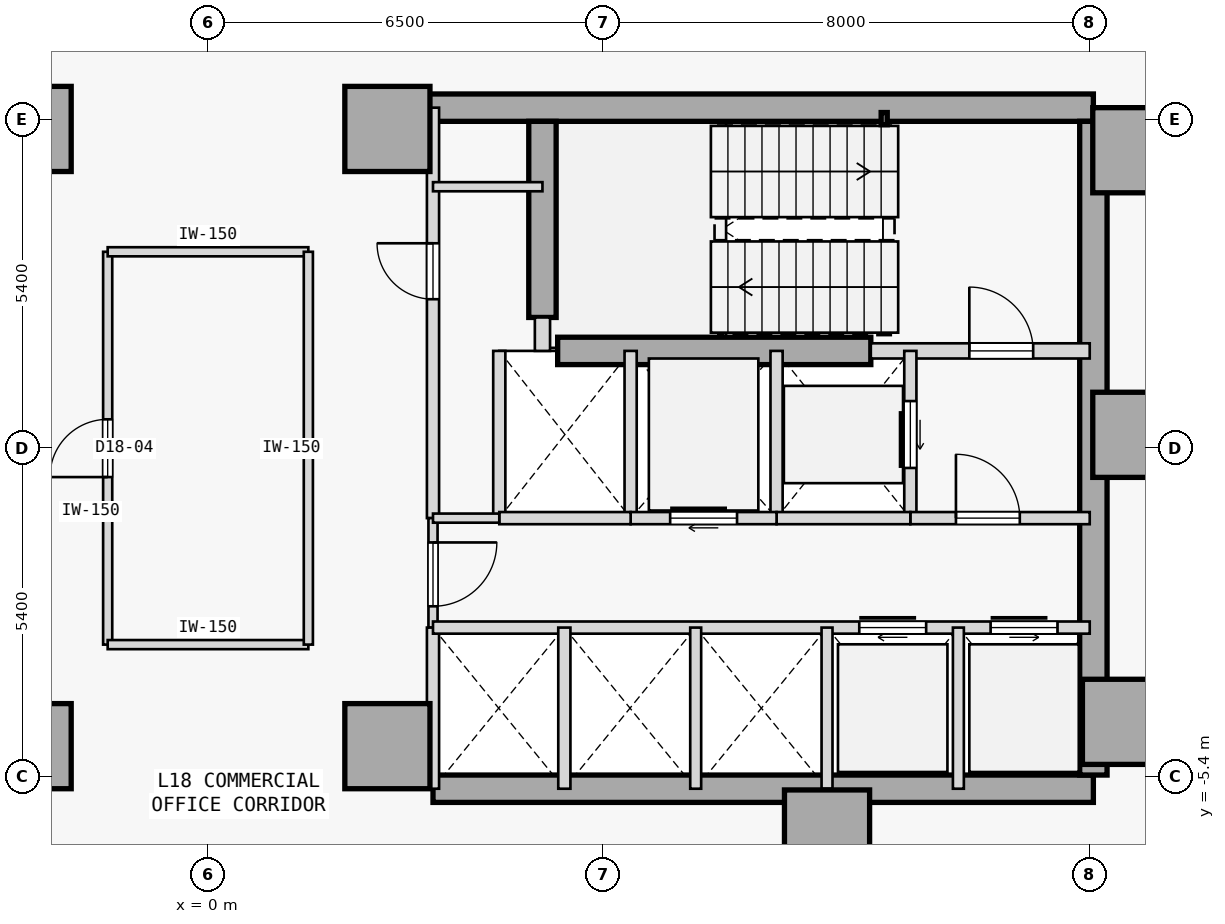
"""IFC4 building model, lengths in metres.
Left out: names, types, materials, properties, quantities, classifications, styles, units other than length and angle.
Written with IfcOpenShell. Run it as: python <this file> out.ifc"""

import sys

from ifc_helpers import new_model, si_unit, direction, frame, frame_2d, origin, origin_2d, place, context, subcontext, project, spatial, rectangle, hollow_rectangle, extrude, element, fill, save


model = new_model("IFC4")
c1 = context("Model", 3, precision=1e-05, world=origin(), true_north=direction((0.0, 1.0)))
c2 = subcontext(c1, "Body", "Model", "MODEL_VIEW")
j1 = project(units=[si_unit("LENGTHUNIT", "METRE"), si_unit("PLANEANGLEUNIT", "RADIAN")], contexts=[c1])
p1 = place(None, origin())
s1 = spatial("IfcSite", under=j1, at=p1, CompositionType="ELEMENT")
p2 = place(p1, origin())
s2 = spatial("IfcBuilding", under=s1, at=p2, CompositionType="ELEMENT")
p3 = place(p2, frame((0.0, 0.0, 75.0)))
s3 = spatial("IfcBuildingStorey", under=s2, at=p3, CompositionType="ELEMENT", Elevation=75.0)
for number, where, z_axis, x_axis in (
    (1, (-2.95, -4.9, 0.0), (0.0, 0.0, 1.0), (1.0, 0.0, 0.0)),
    (2, (-2.95, 5.25, 0.0), (0.0, 0.0, 1.0), (1.0, 0.0, 0.0)),
    (3, (15.25, 4.9, 0.0), (0.0, 0.0, 1.0), (1.0, 0.0, 0.0)),
    (4, (15.25, 0.22, 0.0), (0.0, 0.0, 1.0), (1.0, 0.0, 0.0)),
    (5, (15.08, -4.5, 0.0), (0.0, 0.0, 1.0), (1.0, 0.0, 0.0)),
    (6, (10.18, -6.32, 0.0), (0.0, 0.0, 1.0), (1.0, 0.0, 0.0)),
    (7, (2.95, -4.9, 0.0), (0.0, 0.0, 1.0), (1.0, 0.0, 0.0)),
    (8, (2.95, 5.25, 0.0), (0.0, 0.0, 1.0), (1.0, 0.0, 0.0)),
):
    element("IfcColumn", number, at=place(p3, frame(where, z_axis=z_axis, x_axis=x_axis)), inside=s3, PredefinedType="COLUMN", context=c2, shape_type="SweptSolid", body=[
        extrude(rectangle(XDim=1.4, YDim=1.4, at=origin_2d()), origin(), (0.0, 0.0, 1.0), 3.8),
    ])
p4 = place(p3, frame((3.15, 5.6, 0.0), z_axis=(0.0, 0.0, 1.0), x_axis=(1.0, 0.0, 0.0)))
e9 = element("IfcWall", 9, at=p4, inside=s3, PredefinedType="SHEAR", context=c2, shape_type="SweptSolid", body=[
    extrude(rectangle(XDim=11.41, YDim=0.45, at=frame_2d((5.705, 0.0))), origin(), (0.0, 0.0, 1.0), 3.4),
])
p5 = place(p3, frame((3.7, -5.6, 0.0), z_axis=(0.0, 0.0, 1.0), x_axis=(1.0, 0.0, 0.0)))
e10 = element("IfcWall", 10, at=p5, inside=s3, PredefinedType="SHEAR", context=c2, shape_type="SweptSolid", body=[
    extrude(rectangle(XDim=10.86, YDim=0.45, at=frame_2d((5.43, 0.0))), origin(), (0.0, 0.0, 1.0), 3.4),
])
p6 = place(p3, frame((14.56, -5.375, 0.0), z_axis=(0.0, 0.0, 1.0), x_axis=(0.0, 1.0, 0.0)))
e11 = element("IfcWall", 11, at=p6, inside=s3, PredefinedType="SHEAR", context=c2, shape_type="SweptSolid", body=[
    extrude(rectangle(XDim=10.75, YDim=0.45, at=frame_2d((5.375, 0.0))), origin(), (0.0, 0.0, 1.0), 3.4),
])
p7 = place(p3, frame((5.5, 2.15, 0.0), z_axis=(0.0, 0.0, 1.0), x_axis=(0.0, 1.0, 0.0)))
e12 = element("IfcWall", 12, at=p7, inside=s3, PredefinedType="SHEAR", context=c2, shape_type="SweptSolid", body=[
    extrude(rectangle(XDim=3.225, YDim=0.45, at=frame_2d((1.613, 0.0))), origin(), (0.0, 0.0, 1.0), 3.4),
])
p8 = place(p3, frame((5.75, 1.6, 0.0), z_axis=(0.0, 0.0, 1.0), x_axis=(1.0, 0.0, 0.0)))
e13 = element("IfcWall", 13, at=p8, inside=s3, PredefinedType="SHEAR", context=c2, shape_type="SweptSolid", body=[
    extrude(rectangle(XDim=5.15, YDim=0.45, at=frame_2d((2.575, 0.0))), origin(), (0.0, 0.0, 1.0), 3.4),
])
p9 = place(p3, frame((11.12, 5.42, 0.0), z_axis=(0.0, 0.0, 1.0), x_axis=(1.0, 0.0, 0.0)))
e14 = element("IfcColumn", 14, at=p9, inside=s3, PredefinedType="COLUMN", context=c2, shape_type="SweptSolid", body=[
    extrude(hollow_rectangle(XDim=0.1, YDim=0.2, WallThickness=0.008, at=origin_2d()), origin(), (0.0, 0.0, 1.0), 3.8),
])
p10 = place(p3, frame((10.9, 1.6, 0.0), z_axis=(0.0, 0.0, 1.0), x_axis=(1.0, 0.0, 0.0)))
e15 = element("IfcWall", 15, at=p10, inside=s3, PredefinedType="STANDARD", context=c2, shape_type="SweptSolid", body=[
    extrude(rectangle(XDim=3.6, YDim=0.25, at=frame_2d((1.8, 0.0))), origin(), (0.0, 0.0, 1.0), 3.4),
])
p11 = place(p10, frame((1.62, 0.0, 0.0)))
e16 = element("IfcOpeningElement", 16, at=p11, cuts=e15, PredefinedType="OPENING", context=c2, shape_type="SweptSolid", body=[
    extrude(rectangle(XDim=1.05, YDim=2.15, at=frame_2d((0.525, 1.075))), frame((0.0, 0.135, 0.0), z_axis=(0.0, -1.0, 0.0), x_axis=(1.0, 0.0, 0.0)), (0.0, 0.0, 1.0), 0.27),
])
p12 = place(p3, frame((5.5, 1.6, 0.0), z_axis=(0.0, 0.0, 1.0), x_axis=(0.0, 1.0, 0.0)))
e17 = element("IfcWall", 17, at=p12, inside=s3, PredefinedType="STANDARD", context=c2, shape_type="SweptSolid", body=[
    extrude(rectangle(XDim=0.55, YDim=0.25, at=frame_2d((0.275, 0.0))), origin(), (0.0, 0.0, 1.0), 3.4),
])
p13 = place(p3, frame((3.7, -1.15, 0.0), z_axis=(0.0, 0.0, 1.0), x_axis=(0.0, 1.0, 0.0)))
e18 = element("IfcWall", 18, at=p13, inside=s3, PredefinedType="STANDARD", context=c2, shape_type="SweptSolid", body=[
    extrude(rectangle(XDim=6.75, YDim=0.2, at=frame_2d((3.375, 0.0))), origin(), (0.0, 0.0, 1.0), 3.4),
])
p14 = place(p13, frame((3.6, 0.0, 0.0)))
e19 = element("IfcOpeningElement", 19, at=p14, cuts=e18, PredefinedType="OPENING", context=c2, shape_type="SweptSolid", body=[
    extrude(rectangle(XDim=0.92, YDim=2.15, at=frame_2d((0.46, 1.075))), frame((0.0, 0.11, 0.0), z_axis=(0.0, -1.0, 0.0), x_axis=(1.0, 0.0, 0.0)), (0.0, 0.0, 1.0), 0.22),
])
p15 = place(p3, frame((3.7, -2.95, 0.0), z_axis=(0.0, 0.0, 1.0), x_axis=(0.0, 1.0, 0.0)))
e20 = element("IfcWall", 20, at=p15, inside=s3, PredefinedType="PARTITIONING", context=c2, shape_type="SweptSolid", body=[
    extrude(rectangle(XDim=1.8, YDim=0.15, at=frame_2d((0.9, 0.0))), origin(), (0.0, 0.0, 1.0), 3.4),
])
p16 = place(p15, frame((0.35, 0.0, 0.0)))
e21 = element("IfcOpeningElement", 21, at=p16, cuts=e20, PredefinedType="OPENING", context=c2, shape_type="SweptSolid", body=[
    extrude(rectangle(XDim=1.05, YDim=2.18, at=frame_2d((0.525, 1.09))), frame((0.0, 0.085, 0.0), z_axis=(0.0, -1.0, 0.0), x_axis=(1.0, 0.0, 0.0)), (0.0, 0.0, 1.0), 0.17),
])
p17 = place(p3, frame((3.7, -5.6, 0.0), z_axis=(0.0, 0.0, 1.0), x_axis=(0.0, 1.0, 0.0)))
e22 = element("IfcWall", 22, at=p17, inside=s3, PredefinedType="STANDARD", context=c2, shape_type="SweptSolid", body=[
    extrude(rectangle(XDim=2.65, YDim=0.2, at=frame_2d((1.325, 0.0))), origin(), (0.0, 0.0, 1.0), 3.4),
])
p18 = place(p3, frame((11.55, -1.15, 0.0), z_axis=(0.0, 0.0, 1.0), x_axis=(0.0, 1.0, 0.0)))
e23 = element("IfcWall", 23, at=p18, inside=s3, PredefinedType="STANDARD", context=c2, shape_type="SweptSolid", body=[
    extrude(rectangle(XDim=2.75, YDim=0.2, at=frame_2d((1.375, 0.0))), origin(), (0.0, 0.0, 1.0), 3.4),
])
p19 = place(p18, frame((0.825, 0.0, 0.0)))
e24 = element("IfcOpeningElement", 24, at=p19, cuts=e23, PredefinedType="OPENING", context=c2, shape_type="SweptSolid", body=[
    extrude(rectangle(XDim=1.1, YDim=2.15, at=frame_2d((0.55, 1.075))), frame((0.0, 0.11, 0.0), z_axis=(0.0, -1.0, 0.0), x_axis=(1.0, 0.0, 0.0)), (0.0, 0.0, 1.0), 0.22),
])
p20 = place(p3, frame((9.35, -1.15, 0.0), z_axis=(0.0, 0.0, 1.0), x_axis=(0.0, 1.0, 0.0)))
e25 = element("IfcWall", 25, at=p20, inside=s3, PredefinedType="STANDARD", context=c2, shape_type="SweptSolid", body=[
    extrude(rectangle(XDim=2.75, YDim=0.2, at=frame_2d((1.375, 0.0))), origin(), (0.0, 0.0, 1.0), 3.4),
])
p21 = place(p3, frame((11.55, -1.15, 0.0), z_axis=(0.0, 0.0, 1.0), x_axis=(1.0, 0.0, 0.0)))
e26 = element("IfcWall", 26, at=p21, inside=s3, PredefinedType="STANDARD", context=c2, shape_type="SweptSolid", body=[
    extrude(rectangle(XDim=2.95, YDim=0.2, at=frame_2d((1.475, 0.0))), origin(), (0.0, 0.0, 1.0), 3.4),
])
p22 = place(p21, frame((0.75, 0.0, 0.0)))
e27 = element("IfcOpeningElement", 27, at=p22, cuts=e26, PredefinedType="OPENING", context=c2, shape_type="SweptSolid", body=[
    extrude(rectangle(XDim=1.05, YDim=2.18, at=frame_2d((0.525, 1.09))), frame((0.0, 0.11, 0.0), z_axis=(0.0, -1.0, 0.0), x_axis=(1.0, 0.0, 0.0)), (0.0, 0.0, 1.0), 0.22),
])
p23 = place(p3, frame((9.35, -1.15, 0.0), z_axis=(0.0, 0.0, 1.0), x_axis=(1.0, 0.0, 0.0)))
e28 = element("IfcWall", 28, at=p23, inside=s3, PredefinedType="STANDARD", context=c2, shape_type="SweptSolid", body=[
    extrude(rectangle(XDim=2.2, YDim=0.2, at=frame_2d((1.1, 0.0))), origin(), (0.0, 0.0, 1.0), 3.4),
])
p24 = place(p3, frame((6.95, -1.15, 0.0), z_axis=(0.0, 0.0, 1.0), x_axis=(0.0, 1.0, 0.0)))
e29 = element("IfcWall", 29, at=p24, inside=s3, PredefinedType="STANDARD", context=c2, shape_type="SweptSolid", body=[
    extrude(rectangle(XDim=2.75, YDim=0.2, at=frame_2d((1.375, 0.0))), origin(), (0.0, 0.0, 1.0), 3.4),
])
p25 = place(p3, frame((6.95, -1.15, 0.0), z_axis=(0.0, 0.0, 1.0), x_axis=(1.0, 0.0, 0.0)))
e30 = element("IfcWall", 30, at=p25, inside=s3, PredefinedType="STANDARD", context=c2, shape_type="SweptSolid", body=[
    extrude(rectangle(XDim=2.4, YDim=0.2, at=frame_2d((1.2, 0.0))), origin(), (0.0, 0.0, 1.0), 3.4),
])
p26 = place(p25, frame((0.65, 0.0, 0.0)))
e31 = element("IfcOpeningElement", 31, at=p26, cuts=e30, PredefinedType="OPENING", context=c2, shape_type="SweptSolid", body=[
    extrude(rectangle(XDim=1.1, YDim=2.15, at=frame_2d((0.55, 1.075))), frame((0.0, 0.11, 0.0), z_axis=(0.0, -1.0, 0.0), x_axis=(1.0, 0.0, 0.0)), (0.0, 0.0, 1.0), 0.22),
])
p27 = place(p3, frame((4.79, -1.15, 0.0), z_axis=(0.0, 0.0, 1.0), x_axis=(0.0, 1.0, 0.0)))
e32 = element("IfcWall", 32, at=p27, inside=s3, PredefinedType="STANDARD", context=c2, shape_type="SweptSolid", body=[
    extrude(rectangle(XDim=2.75, YDim=0.2, at=frame_2d((1.375, 0.0))), origin(), (0.0, 0.0, 1.0), 3.4),
])
p28 = place(p3, frame((4.79, -1.15, 0.0), z_axis=(0.0, 0.0, 1.0), x_axis=(1.0, 0.0, 0.0)))
e33 = element("IfcWall", 33, at=p28, inside=s3, PredefinedType="STANDARD", context=c2, shape_type="SweptSolid", body=[
    extrude(rectangle(XDim=2.16, YDim=0.2, at=frame_2d((1.08, 0.0))), origin(), (0.0, 0.0, 1.0), 3.4),
])
p29 = place(p3, frame((3.7, -1.15, 0.0), z_axis=(0.0, 0.0, 1.0), x_axis=(1.0, 0.0, 0.0)))
e34 = element("IfcWall", 34, at=p29, inside=s3, PredefinedType="PARTITIONING", context=c2, shape_type="SweptSolid", body=[
    extrude(rectangle(XDim=1.09, YDim=0.15, at=frame_2d((0.545, 0.0))), origin(), (0.0, 0.0, 1.0), 3.4),
])
p30 = place(p3, frame((3.7, -2.95, 0.0), z_axis=(0.0, 0.0, 1.0), x_axis=(1.0, 0.0, 0.0)))
e35 = element("IfcWall", 35, at=p30, inside=s3, PredefinedType="STANDARD", context=c2, shape_type="SweptSolid", body=[
    extrude(rectangle(XDim=10.8, YDim=0.2, at=frame_2d((5.4, 0.0))), origin(), (0.0, 0.0, 1.0), 3.4),
])
p31 = place(p30, frame((7.01, 0.0, 0.0)))
e36 = element("IfcOpeningElement", 36, at=p31, cuts=e35, PredefinedType="OPENING", context=c2, shape_type="SweptSolid", body=[
    extrude(rectangle(XDim=1.1, YDim=2.15, at=frame_2d((0.55, 1.075))), frame((0.0, 0.11, 0.0), z_axis=(0.0, -1.0, 0.0), x_axis=(1.0, 0.0, 0.0)), (0.0, 0.0, 1.0), 0.22),
])
p32 = place(p30, frame((9.17, 0.0, 0.0)))
e37 = element("IfcOpeningElement", 37, at=p32, cuts=e35, PredefinedType="OPENING", context=c2, shape_type="SweptSolid", body=[
    extrude(rectangle(XDim=1.1, YDim=2.15, at=frame_2d((0.55, 1.075))), frame((0.0, 0.11, 0.0), z_axis=(0.0, -1.0, 0.0), x_axis=(1.0, 0.0, 0.0)), (0.0, 0.0, 1.0), 0.22),
])
p33 = place(p3, frame((5.86, -5.6, 0.0), z_axis=(0.0, 0.0, 1.0), x_axis=(0.0, 1.0, 0.0)))
e38 = element("IfcWall", 38, at=p33, inside=s3, PredefinedType="STANDARD", context=c2, shape_type="SweptSolid", body=[
    extrude(rectangle(XDim=2.65, YDim=0.2, at=frame_2d((1.325, 0.0))), origin(), (0.0, 0.0, 1.0), 3.4),
])
for number, where, z_axis, x_axis in (
    (39, (12.34, -5.6, 0.0), (0.0, 0.0, 1.0), (0.0, 1.0, 0.0)),
    (40, (10.18, -5.6, 0.0), (0.0, 0.0, 1.0), (0.0, 1.0, 0.0)),
    (41, (8.02, -5.6, 0.0), (0.0, 0.0, 1.0), (0.0, 1.0, 0.0)),
):
    element("IfcWall", number, at=place(p3, frame(where, z_axis=z_axis, x_axis=x_axis)), inside=s3, PredefinedType="STANDARD", context=c2, shape_type="SweptSolid", body=[
        extrude(rectangle(XDim=2.65, YDim=0.18, at=frame_2d((1.325, 0.0))), origin(), (0.0, 0.0, 1.0), 3.4),
    ])
p34 = place(p3, frame((3.7, 4.3, 0.0), z_axis=(0.0, 0.0, 1.0), x_axis=(1.0, 0.0, 0.0)))
e42 = element("IfcWall", 42, at=p34, inside=s3, PredefinedType="PARTITIONING", context=c2, shape_type="SweptSolid", body=[
    extrude(rectangle(XDim=1.8, YDim=0.15, at=frame_2d((0.9, 0.0))), origin(), (0.0, 0.0, 1.0), 3.4),
])
p35 = place(p3, frame((-1.65, -3.23, 0.0), z_axis=(0.0, 0.0, 1.0), x_axis=(0.0, 1.0, 0.0)))
e43 = element("IfcWall", 43, at=p35, inside=s3, PredefinedType="PARTITIONING", context=c2, shape_type="SweptSolid", body=[
    extrude(rectangle(XDim=6.46, YDim=0.15, at=frame_2d((3.23, 0.0))), origin(), (0.0, 0.0, 1.0), 3.4),
])
p36 = place(p35, frame((2.755, 0.0, 0.0)))
e44 = element("IfcOpeningElement", 44, at=p36, cuts=e43, PredefinedType="OPENING", context=c2, shape_type="SweptSolid", body=[
    extrude(rectangle(XDim=0.95, YDim=2.15, at=frame_2d((0.475, 1.075))), frame((0.0, 0.085, 0.0), z_axis=(0.0, -1.0, 0.0), x_axis=(1.0, 0.0, 0.0)), (0.0, 0.0, 1.0), 0.17),
])
for number, where, z_axis, x_axis in (
    (45, (-1.65, -3.23, 0.0), (0.0, 0.0, 1.0), (1.0, 0.0, 0.0)),
    (46, (-1.65, 3.23, 0.0), (0.0, 0.0, 1.0), (1.0, 0.0, 0.0)),
):
    element("IfcWall", number, at=place(p3, frame(where, z_axis=z_axis, x_axis=x_axis)), inside=s3, PredefinedType="PARTITIONING", context=c2, shape_type="SweptSolid", body=[
        extrude(rectangle(XDim=3.3, YDim=0.15, at=frame_2d((1.65, 0.0))), origin(), (0.0, 0.0, 1.0), 3.4),
    ])
p37 = place(p3, frame((1.65, -3.23, 0.0), z_axis=(0.0, 0.0, 1.0), x_axis=(0.0, 1.0, 0.0)))
e47 = element("IfcWall", 47, at=p37, inside=s3, PredefinedType="PARTITIONING", context=c2, shape_type="SweptSolid", body=[
    extrude(rectangle(XDim=6.46, YDim=0.15, at=frame_2d((3.23, 0.0))), origin(), (0.0, 0.0, 1.0), 3.4),
])
p38 = place(p11, origin())
e48 = element("IfcDoor", 48, at=p38, inside=s3, OperationType="SINGLE_SWING_LEFT", PredefinedType="DOOR", context=c2, shape_type="SweptSolid", body=[
    extrude(rectangle(XDim=1.05, YDim=2.15, at=frame_2d((0.525, 1.075))), frame((0.0, 0.025, 0.0), z_axis=(0.0, -1.0, 0.0), x_axis=(1.0, 0.0, 0.0)), (0.0, 0.0, 1.0), 0.05),
])
fill(e16, e48)
p39 = place(p22, origin())
e49 = element("IfcDoor", 49, at=p39, inside=s3, OperationType="SINGLE_SWING_LEFT", PredefinedType="DOOR", context=c2, shape_type="SweptSolid", body=[
    extrude(rectangle(XDim=1.05, YDim=2.18, at=frame_2d((0.525, 1.09))), frame((0.0, 0.025, 0.0), z_axis=(0.0, -1.0, 0.0), x_axis=(1.0, 0.0, 0.0)), (0.0, 0.0, 1.0), 0.05),
])
fill(e27, e49)
p40 = place(p16, frame((1.05, 0.0, 0.0), z_axis=(0.0, 0.0, 1.0), x_axis=(-1.0, 0.0, 0.0)))
e50 = element("IfcDoor", 50, at=p40, inside=s3, OperationType="SINGLE_SWING_RIGHT", PredefinedType="DOOR", context=c2, shape_type="SweptSolid", body=[
    extrude(rectangle(XDim=1.05, YDim=2.18, at=frame_2d((0.525, 1.09))), frame((0.0, 0.025, 0.0), z_axis=(0.0, -1.0, 0.0), x_axis=(1.0, 0.0, 0.0)), (0.0, 0.0, 1.0), 0.05),
])
fill(e21, e50)
p41 = place(p19, origin())
e51 = element("IfcDoor", 51, at=p41, inside=s3, OperationType="SLIDING_TO_RIGHT", PredefinedType="DOOR", context=c2, shape_type="SweptSolid", body=[
    extrude(rectangle(XDim=1.1, YDim=2.15, at=frame_2d((0.55, 1.075))), frame((0.0, 0.025, 0.0), z_axis=(0.0, -1.0, 0.0), x_axis=(1.0, 0.0, 0.0)), (0.0, 0.0, 1.0), 0.05),
])
fill(e24, e51)
p42 = place(p26, origin())
e52 = element("IfcDoor", 52, at=p42, inside=s3, OperationType="SLIDING_TO_RIGHT", PredefinedType="DOOR", context=c2, shape_type="SweptSolid", body=[
    extrude(rectangle(XDim=1.1, YDim=2.15, at=frame_2d((0.55, 1.075))), frame((0.0, 0.025, 0.0), z_axis=(0.0, -1.0, 0.0), x_axis=(1.0, 0.0, 0.0)), (0.0, 0.0, 1.0), 0.05),
])
fill(e31, e52)
p43 = place(p31, origin())
e53 = element("IfcDoor", 53, at=p43, inside=s3, OperationType="SLIDING_TO_RIGHT", PredefinedType="DOOR", context=c2, shape_type="SweptSolid", body=[
    extrude(rectangle(XDim=1.1, YDim=2.15, at=frame_2d((0.55, 1.075))), frame((0.0, 0.025, 0.0), z_axis=(0.0, -1.0, 0.0), x_axis=(1.0, 0.0, 0.0)), (0.0, 0.0, 1.0), 0.05),
])
fill(e36, e53)
p44 = place(p32, origin())
e54 = element("IfcDoor", 54, at=p44, inside=s3, OperationType="SLIDING_TO_LEFT", PredefinedType="DOOR", context=c2, shape_type="SweptSolid", body=[
    extrude(rectangle(XDim=1.1, YDim=2.15, at=frame_2d((0.55, 1.075))), frame((0.0, 0.025, 0.0), z_axis=(0.0, -1.0, 0.0), x_axis=(1.0, 0.0, 0.0)), (0.0, 0.0, 1.0), 0.05),
])
fill(e37, e54)
p45 = place(p14, origin())
e55 = element("IfcDoor", 55, at=p45, inside=s3, OperationType="SINGLE_SWING_RIGHT", PredefinedType="DOOR", context=c2, shape_type="SweptSolid", body=[
    extrude(rectangle(XDim=0.92, YDim=2.15, at=frame_2d((0.46, 1.075))), frame((0.0, 0.025, 0.0), z_axis=(0.0, -1.0, 0.0), x_axis=(1.0, 0.0, 0.0)), (0.0, 0.0, 1.0), 0.05),
])
fill(e19, e55)
p46 = place(p36, origin())
e56 = element("IfcDoor", 56, at=p46, inside=s3, OperationType="SINGLE_SWING_LEFT", PredefinedType="DOOR", context=c2, shape_type="SweptSolid", body=[
    extrude(rectangle(XDim=0.95, YDim=2.15, at=frame_2d((0.475, 1.075))), frame((0.0, 0.025, 0.0), z_axis=(0.0, -1.0, 0.0), x_axis=(1.0, 0.0, 0.0)), (0.0, 0.0, 1.0), 0.05),
])
fill(e44, e56)
save(model, sys.argv[1])
